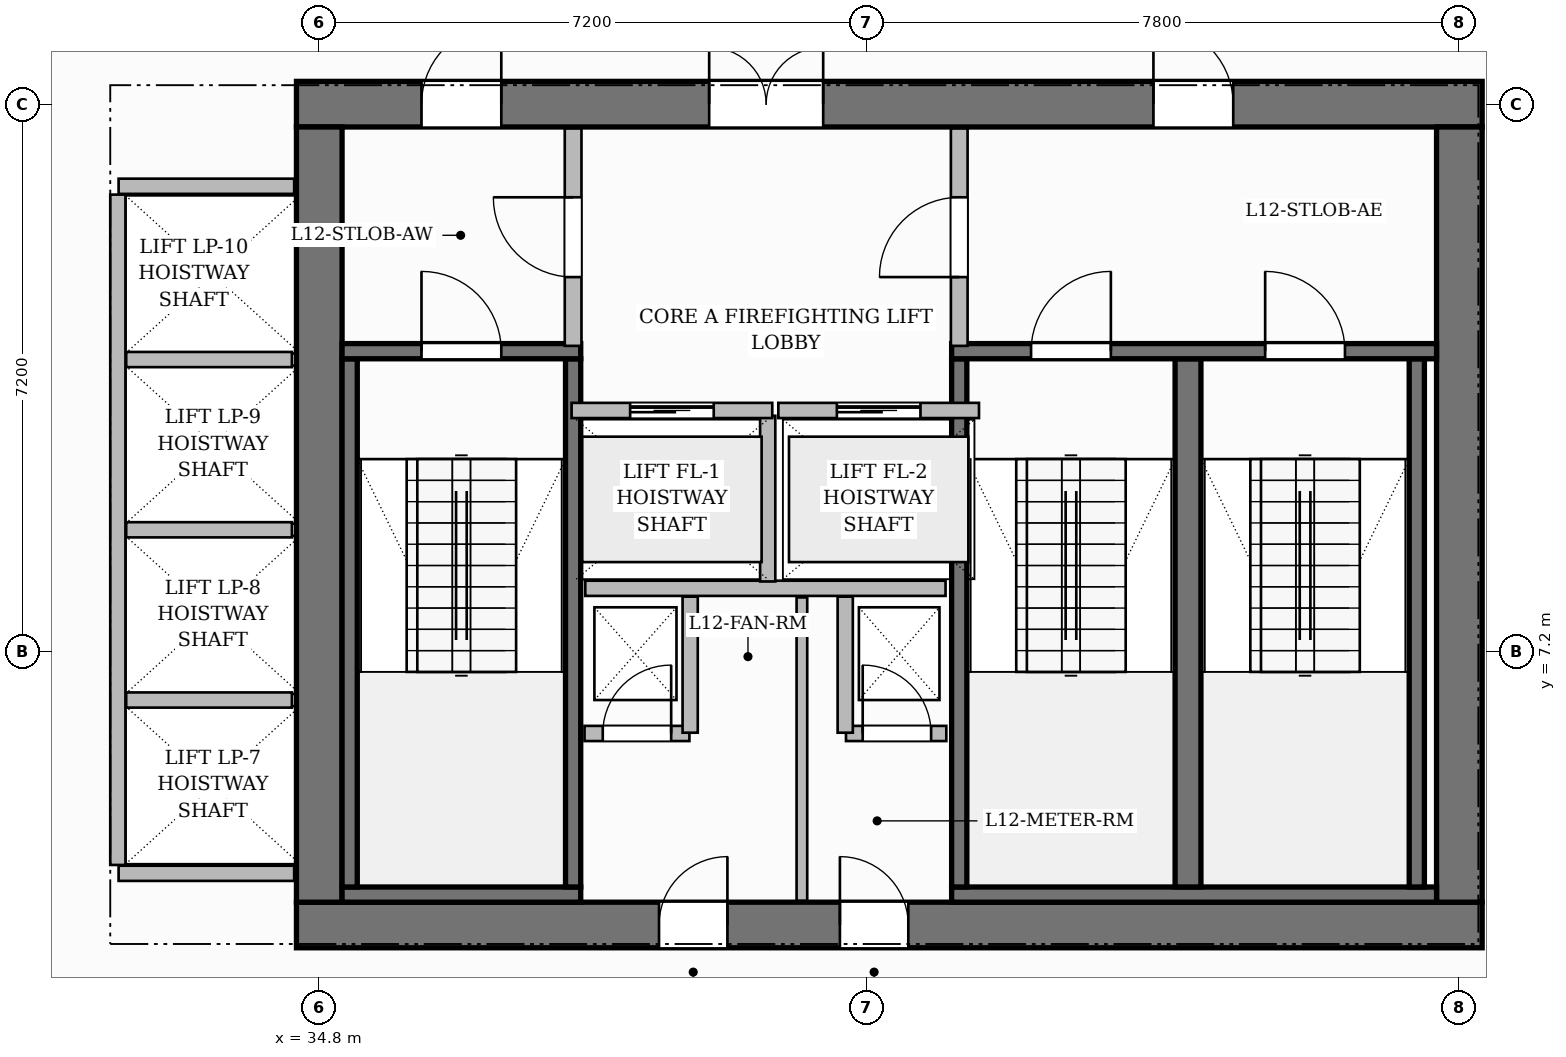
"""IFC4 building model, lengths in metres.
Left out: names, types, materials, properties, quantities, classifications, styles, units other than length and angle.
Written with IfcOpenShell. Run it as: python <this file> out.ifc"""

import sys

from ifc_helpers import new_model, si_unit, direction, frame, frame_2d, origin, place, context, subcontext, project, spatial, rectangle, extrude, source, transform, mapped, element, fill, save


model = new_model("IFC4")
c1 = context("Model", 3, precision=1e-05, world=origin(), true_north=direction((0.0, 1.0)))
c2 = subcontext(c1, "Body", "Model", "MODEL_VIEW")
j1 = project(units=[si_unit("LENGTHUNIT", "METRE"), si_unit("PLANEANGLEUNIT", "RADIAN")], contexts=[c1])
p1 = place(None, origin())
s1 = spatial("IfcSite", under=j1, at=p1, CompositionType="ELEMENT")
p2 = place(p1, origin())
s2 = spatial("IfcBuilding", under=s1, at=p2, CompositionType="ELEMENT")
p3 = place(p2, frame((0.0, 0.0, 54.6)))
s3 = spatial("IfcBuildingStorey", under=s2, at=p3, CompositionType="ELEMENT", Elevation=54.6)
p4 = place(p3, frame((34.5, 3.6, 0.0), z_axis=(0.0, 0.0, 1.0), x_axis=(1.0, 0.0, 0.0)))
e1 = element("IfcWall", 1, at=p4, inside=s3, PredefinedType="SHEAR", context=c2, shape_type="SweptSolid", body=[
    extrude(rectangle(XDim=15.6, YDim=0.6, at=frame_2d((7.8, 0.0))), origin(), (0.0, 0.0, 1.0), 3.7),
])
p5 = place(p4, frame((4.77, 0.0, 0.0)))
e2 = element("IfcOpeningElement", 2, at=p5, cuts=e1, PredefinedType="OPENING", context=c2, shape_type="SweptSolid", body=[
    extrude(rectangle(XDim=0.9, YDim=2.1, at=frame_2d((0.45, 1.05))), frame((0.0, 0.31, 0.0), z_axis=(0.0, -1.0, 0.0), x_axis=(1.0, 0.0, 0.0)), (0.0, 0.0, 1.0), 0.62),
])
p6 = place(p4, frame((7.15, 0.0, 0.0)))
e3 = element("IfcOpeningElement", 3, at=p6, cuts=e1, PredefinedType="OPENING", context=c2, shape_type="SweptSolid", body=[
    extrude(rectangle(XDim=0.9, YDim=2.1, at=frame_2d((0.45, 1.05))), frame((0.0, 0.31, 0.0), z_axis=(0.0, -1.0, 0.0), x_axis=(1.0, 0.0, 0.0)), (0.0, 0.0, 1.0), 0.62),
])
p7 = place(p3, frame((34.5, 14.4, 0.0), z_axis=(0.0, 0.0, 1.0), x_axis=(1.0, 0.0, 0.0)))
e4 = element("IfcWall", 4, at=p7, inside=s3, PredefinedType="SHEAR", context=c2, shape_type="SweptSolid", body=[
    extrude(rectangle(XDim=15.6, YDim=0.6, at=frame_2d((7.8, 0.0))), origin(), (0.0, 0.0, 1.0), 3.7),
])
p8 = place(p7, frame((5.43, 0.0, 0.0)))
e5 = element("IfcOpeningElement", 5, at=p8, cuts=e4, PredefinedType="OPENING", context=c2, shape_type="SweptSolid", body=[
    extrude(rectangle(XDim=1.5, YDim=2.2, at=frame_2d((0.75, 1.1))), frame((0.0, 0.31, 0.0), z_axis=(0.0, -1.0, 0.0), x_axis=(1.0, 0.0, 0.0)), (0.0, 0.0, 1.0), 0.62),
])
p9 = place(p7, frame((1.645, 0.0, 0.0)))
e6 = element("IfcOpeningElement", 6, at=p9, cuts=e4, PredefinedType="OPENING", context=c2, shape_type="SweptSolid", body=[
    extrude(rectangle(XDim=1.05, YDim=2.15, at=frame_2d((0.525, 1.075))), frame((0.0, 0.31, 0.0), z_axis=(0.0, -1.0, 0.0), x_axis=(1.0, 0.0, 0.0)), (0.0, 0.0, 1.0), 0.62),
])
p10 = place(p7, frame((11.275, 0.0, 0.0)))
e7 = element("IfcOpeningElement", 7, at=p10, cuts=e4, PredefinedType="OPENING", context=c2, shape_type="SweptSolid", body=[
    extrude(rectangle(XDim=1.05, YDim=2.15, at=frame_2d((0.525, 1.075))), frame((0.0, 0.31, 0.0), z_axis=(0.0, -1.0, 0.0), x_axis=(1.0, 0.0, 0.0)), (0.0, 0.0, 1.0), 0.62),
])
for number, where, z_axis, x_axis in (
    (8, (34.8, 3.9, 0.0), (0.0, 0.0, 1.0), (0.0, 1.0, 0.0)),
    (9, (49.8, 3.9, 0.0), (0.0, 0.0, 1.0), (0.0, 1.0, 0.0)),
):
    element("IfcWall", number, at=place(p3, frame(where, z_axis=z_axis, x_axis=x_axis)), inside=s3, PredefinedType="SHEAR", context=c2, shape_type="SweptSolid", body=[
        extrude(rectangle(XDim=10.2, YDim=0.6, at=frame_2d((5.1, 0.0))), origin(), (0.0, 0.0, 1.0), 3.7),
    ])
p11 = place(p3, frame((35.1, 4.0, 0.0), z_axis=(0.0, 0.0, 1.0), x_axis=(1.0, 0.0, 0.0)))
e10 = element("IfcWall", 10, at=p11, inside=s3, PredefinedType="SHEAR", context=c2, shape_type="SweptSolid", body=[
    extrude(rectangle(XDim=3.14, YDim=0.2, at=frame_2d((1.57, 0.0))), origin(), (0.0, 0.0, 1.0), 3.7),
])
for number, where, z_axis, x_axis in (
    (11, (35.2, 4.1, 0.0), (0.0, 0.0, 1.0), (0.0, 1.0, 0.0)),
    (12, (38.14, 4.1, 0.0), (0.0, 0.0, 1.0), (0.0, 1.0, 0.0)),
):
    element("IfcWall", number, at=place(p3, frame(where, z_axis=z_axis, x_axis=x_axis)), inside=s3, PredefinedType="SHEAR", context=c2, shape_type="SweptSolid", body=[
        extrude(rectangle(XDim=6.95, YDim=0.2, at=frame_2d((3.475, 0.0))), origin(), (0.0, 0.0, 1.0), 3.7),
    ])
p12 = place(p3, frame((35.1, 11.15, 0.0), z_axis=(0.0, 0.0, 1.0), x_axis=(1.0, 0.0, 0.0)))
e13 = element("IfcWall", 13, at=p12, inside=s3, PredefinedType="SHEAR", context=c2, shape_type="SweptSolid", body=[
    extrude(rectangle(XDim=3.14, YDim=0.2, at=frame_2d((1.57, 0.0))), origin(), (0.0, 0.0, 1.0), 3.7),
])
p13 = place(p12, frame((1.045, 0.0, 0.0)))
e14 = element("IfcOpeningElement", 14, at=p13, cuts=e13, PredefinedType="OPENING", context=c2, shape_type="SweptSolid", body=[
    extrude(rectangle(XDim=1.05, YDim=2.2, at=frame_2d((0.525, 1.1))), frame((0.0, 0.11, 0.0), z_axis=(0.0, -1.0, 0.0), x_axis=(1.0, 0.0, 0.0)), (0.0, 0.0, 1.0), 0.22),
])
p14 = place(p3, frame((43.12, 4.0, 0.0), z_axis=(0.0, 0.0, 1.0), x_axis=(1.0, 0.0, 0.0)))
e15 = element("IfcWall", 15, at=p14, inside=s3, PredefinedType="SHEAR", context=c2, shape_type="SweptSolid", body=[
    extrude(rectangle(XDim=6.38, YDim=0.2, at=frame_2d((3.19, 0.0))), origin(), (0.0, 0.0, 1.0), 3.7),
])
p15 = place(p3, frame((43.22, 4.1, 0.0), z_axis=(0.0, 0.0, 1.0), x_axis=(0.0, 1.0, 0.0)))
e16 = element("IfcWall", 16, at=p15, inside=s3, PredefinedType="SHEAR", context=c2, shape_type="SweptSolid", body=[
    extrude(rectangle(XDim=6.95, YDim=0.2, at=frame_2d((3.475, 0.0))), origin(), (0.0, 0.0, 1.0), 3.7),
])
p16 = place(p3, frame((46.23, 4.1, 0.0), z_axis=(0.0, 0.0, 1.0), x_axis=(0.0, 1.0, 0.0)))
e17 = element("IfcWall", 17, at=p16, inside=s3, PredefinedType="SHEAR", context=c2, shape_type="SweptSolid", body=[
    extrude(rectangle(XDim=6.95, YDim=0.34, at=frame_2d((3.475, 0.0))), origin(), (0.0, 0.0, 1.0), 3.7),
])
p17 = place(p3, frame((49.24, 4.1, 0.0), z_axis=(0.0, 0.0, 1.0), x_axis=(0.0, 1.0, 0.0)))
e18 = element("IfcWall", 18, at=p17, inside=s3, PredefinedType="SHEAR", context=c2, shape_type="SweptSolid", body=[
    extrude(rectangle(XDim=6.95, YDim=0.2, at=frame_2d((3.475, 0.0))), origin(), (0.0, 0.0, 1.0), 3.7),
])
p18 = place(p3, frame((43.12, 11.15, 0.0), z_axis=(0.0, 0.0, 1.0), x_axis=(1.0, 0.0, 0.0)))
e19 = element("IfcWall", 19, at=p18, inside=s3, PredefinedType="SHEAR", context=c2, shape_type="SweptSolid", body=[
    extrude(rectangle(XDim=6.38, YDim=0.2, at=frame_2d((3.19, 0.0))), origin(), (0.0, 0.0, 1.0), 3.7),
])
p19 = place(p18, frame((1.045, 0.0, 0.0)))
e20 = element("IfcOpeningElement", 20, at=p19, cuts=e19, PredefinedType="OPENING", context=c2, shape_type="SweptSolid", body=[
    extrude(rectangle(XDim=1.05, YDim=2.2, at=frame_2d((0.525, 1.1))), frame((0.0, 0.11, 0.0), z_axis=(0.0, -1.0, 0.0), x_axis=(1.0, 0.0, 0.0)), (0.0, 0.0, 1.0), 0.22),
])
p20 = place(p18, frame((4.125, 0.0, 0.0)))
e21 = element("IfcOpeningElement", 21, at=p20, cuts=e19, PredefinedType="OPENING", context=c2, shape_type="SweptSolid", body=[
    extrude(rectangle(XDim=1.05, YDim=2.2, at=frame_2d((0.525, 1.1))), frame((0.0, 0.11, 0.0), z_axis=(0.0, -1.0, 0.0), x_axis=(1.0, 0.0, 0.0)), (0.0, 0.0, 1.0), 0.22),
])
p21 = place(p3, frame((38.3, 8.03, 0.0), z_axis=(0.0, 0.0, 1.0), x_axis=(1.0, 0.0, 0.0)))
e22 = element("IfcWall", 22, at=p21, inside=s3, PredefinedType="PARTITIONING", context=c2, shape_type="SweptSolid", body=[
    extrude(rectangle(XDim=4.74, YDim=0.2, at=frame_2d((2.37, 0.0))), origin(), (0.0, 0.0, 1.0), 3.45),
])
p22 = place(p3, frame((40.7, 8.12, 0.0), z_axis=(0.0, 0.0, 1.0), x_axis=(0.0, 1.0, 0.0)))
e23 = element("IfcWall", 23, at=p22, inside=s3, PredefinedType="PARTITIONING", context=c2, shape_type="SweptSolid", body=[
    extrude(rectangle(XDim=2.18, YDim=0.2, at=frame_2d((1.09, 0.0))), origin(), (0.0, 0.0, 1.0), 3.45),
])
p23 = place(p3, frame((38.14, 11.22, 0.0), z_axis=(0.0, 0.0, 1.0), x_axis=(0.0, 1.0, 0.0)))
e24 = element("IfcWall", 24, at=p23, inside=s3, PredefinedType="PARTITIONING", context=c2, shape_type="SweptSolid", body=[
    extrude(rectangle(XDim=2.86, YDim=0.22, at=frame_2d((1.43, 0.0))), origin(), (0.0, 0.0, 1.0), 3.45),
])
p24 = place(p23, frame((0.905, 0.0, 0.0)))
e25 = element("IfcOpeningElement", 25, at=p24, cuts=e24, PredefinedType="OPENING", context=c2, shape_type="SweptSolid", body=[
    extrude(rectangle(XDim=1.05, YDim=2.15, at=frame_2d((0.525, 1.075))), frame((0.0, 0.12, 0.0), z_axis=(0.0, -1.0, 0.0), x_axis=(1.0, 0.0, 0.0)), (0.0, 0.0, 1.0), 0.24),
])
p25 = place(p3, frame((43.22, 11.22, 0.0), z_axis=(0.0, 0.0, 1.0), x_axis=(0.0, 1.0, 0.0)))
e26 = element("IfcWall", 26, at=p25, inside=s3, PredefinedType="PARTITIONING", context=c2, shape_type="SweptSolid", body=[
    extrude(rectangle(XDim=2.86, YDim=0.22, at=frame_2d((1.43, 0.0))), origin(), (0.0, 0.0, 1.0), 3.45),
])
p26 = place(p25, frame((0.905, 0.0, 0.0)))
e27 = element("IfcOpeningElement", 27, at=p26, cuts=e26, PredefinedType="OPENING", context=c2, shape_type="SweptSolid", body=[
    extrude(rectangle(XDim=1.05, YDim=2.15, at=frame_2d((0.525, 1.075))), frame((0.0, 0.12, 0.0), z_axis=(0.0, -1.0, 0.0), x_axis=(1.0, 0.0, 0.0)), (0.0, 0.0, 1.0), 0.24),
])
p27 = place(p3, frame((38.29, 6.12, 0.0), z_axis=(0.0, 0.0, 1.0), x_axis=(1.0, 0.0, 0.0)))
e28 = element("IfcWall", 28, at=p27, inside=s3, PredefinedType="PARTITIONING", context=c2, shape_type="SweptSolid", body=[
    extrude(rectangle(XDim=1.38, YDim=0.2, at=frame_2d((0.69, 0.0))), origin(), (0.0, 0.0, 1.0), 3.45),
])
p28 = place(p27, frame((0.24, 0.0, 0.0)))
e29 = element("IfcOpeningElement", 29, at=p28, cuts=e28, PredefinedType="OPENING", context=c2, shape_type="SweptSolid", body=[
    extrude(rectangle(XDim=0.9, YDim=2.1, at=frame_2d((0.45, 1.05))), frame((0.0, 0.11, 0.0), z_axis=(0.0, -1.0, 0.0), x_axis=(1.0, 0.0, 0.0)), (0.0, 0.0, 1.0), 0.22),
])
p29 = place(p3, frame((39.68, 6.13, 0.0), z_axis=(0.0, 0.0, 1.0), x_axis=(0.0, 1.0, 0.0)))
e30 = element("IfcWall", 30, at=p29, inside=s3, PredefinedType="PARTITIONING", context=c2, shape_type="SweptSolid", body=[
    extrude(rectangle(XDim=1.79, YDim=0.2, at=frame_2d((0.895, 0.0))), origin(), (0.0, 0.0, 1.0), 3.45),
])
p30 = place(p3, frame((41.73, 6.12, 0.0), z_axis=(0.0, 0.0, 1.0), x_axis=(1.0, 0.0, 0.0)))
e31 = element("IfcWall", 31, at=p30, inside=s3, PredefinedType="PARTITIONING", context=c2, shape_type="SweptSolid", body=[
    extrude(rectangle(XDim=1.32, YDim=0.2, at=frame_2d((0.66, 0.0))), origin(), (0.0, 0.0, 1.0), 3.45),
])
p31 = place(p30, frame((0.22, 0.0, 0.0)))
e32 = element("IfcOpeningElement", 32, at=p31, cuts=e31, PredefinedType="OPENING", context=c2, shape_type="SweptSolid", body=[
    extrude(rectangle(XDim=0.9, YDim=2.1, at=frame_2d((0.45, 1.05))), frame((0.0, 0.11, 0.0), z_axis=(0.0, -1.0, 0.0), x_axis=(1.0, 0.0, 0.0)), (0.0, 0.0, 1.0), 0.22),
])
p32 = place(p3, frame((41.72, 6.13, 0.0), z_axis=(0.0, 0.0, 1.0), x_axis=(0.0, 1.0, 0.0)))
e33 = element("IfcWall", 33, at=p32, inside=s3, PredefinedType="PARTITIONING", context=c2, shape_type="SweptSolid", body=[
    extrude(rectangle(XDim=1.79, YDim=0.2, at=frame_2d((0.895, 0.0))), origin(), (0.0, 0.0, 1.0), 3.45),
])
p33 = place(p3, frame((41.15, 3.92, 0.0), z_axis=(0.0, 0.0, 1.0), x_axis=(0.0, 1.0, 0.0)))
e34 = element("IfcWall", 34, at=p33, inside=s3, PredefinedType="PARTITIONING", context=c2, shape_type="SweptSolid", body=[
    extrude(rectangle(XDim=3.99, YDim=0.14, at=frame_2d((1.995, 0.0))), origin(), (0.0, 0.0, 1.0), 3.45),
])
for number, where, z_axis, x_axis in (
    (35, (32.16, 4.28, 0.0), (0.0, 0.0, 1.0), (1.0, 0.0, 0.0)),
    (36, (32.16, 13.32, 0.0), (0.0, 0.0, 1.0), (1.0, 0.0, 0.0)),
):
    element("IfcWall", number, at=place(p3, frame(where, z_axis=z_axis, x_axis=x_axis)), inside=s3, PredefinedType="PARTITIONING", context=c2, shape_type="SweptSolid", body=[
        extrude(rectangle(XDim=2.31, YDim=0.2, at=frame_2d((1.155, 0.0))), origin(), (0.0, 0.0, 1.0), 3.45),
    ])
p34 = place(p3, frame((32.15, 4.39, 0.0), z_axis=(0.0, 0.0, 1.0), x_axis=(0.0, 1.0, 0.0)))
e37 = element("IfcWall", 37, at=p34, inside=s3, PredefinedType="PARTITIONING", context=c2, shape_type="SweptSolid", body=[
    extrude(rectangle(XDim=8.82, YDim=0.2, at=frame_2d((4.41, 0.0))), origin(), (0.0, 0.0, 1.0), 3.45),
])
for number, where, z_axis, x_axis in (
    (38, (32.26, 6.56, 0.0), (0.0, 0.0, 1.0), (1.0, 0.0, 0.0)),
    (39, (32.26, 8.8, 0.0), (0.0, 0.0, 1.0), (1.0, 0.0, 0.0)),
    (40, (32.26, 11.04, 0.0), (0.0, 0.0, 1.0), (1.0, 0.0, 0.0)),
):
    element("IfcWall", number, at=place(p3, frame(where, z_axis=z_axis, x_axis=x_axis)), inside=s3, PredefinedType="PARTITIONING", context=c2, shape_type="SweptSolid", body=[
        extrude(rectangle(XDim=2.18, YDim=0.2, at=frame_2d((1.09, 0.0))), origin(), (0.0, 0.0, 1.0), 3.45),
    ])
p35 = place(p3, frame((38.12, 10.37, 0.0), z_axis=(0.0, 0.0, 1.0), x_axis=(1.0, 0.0, 0.0)))
e41 = element("IfcWall", 41, at=p35, inside=s3, PredefinedType="PARTITIONING", context=c2, shape_type="SweptSolid", body=[
    extrude(rectangle(XDim=2.64, YDim=0.2, at=frame_2d((1.32, 0.0))), origin(), (0.0, 0.0, 1.0), 3.45),
])
p36 = place(p35, frame((0.77, 0.0, 0.0)))
e42 = element("IfcOpeningElement", 42, at=p36, cuts=e41, PredefinedType="OPENING", context=c2, shape_type="SweptSolid", body=[
    extrude(rectangle(XDim=1.1, YDim=2.2, at=frame_2d((0.55, 1.1))), frame((0.0, 0.11, 0.0), z_axis=(0.0, -1.0, 0.0), x_axis=(1.0, 0.0, 0.0)), (0.0, 0.0, 1.0), 0.22),
])
p37 = place(p3, frame((40.84, 10.37, 0.0), z_axis=(0.0, 0.0, 1.0), x_axis=(1.0, 0.0, 0.0)))
e43 = element("IfcWall", 43, at=p37, inside=s3, PredefinedType="PARTITIONING", context=c2, shape_type="SweptSolid", body=[
    extrude(rectangle(XDim=2.64, YDim=0.2, at=frame_2d((1.32, 0.0))), origin(), (0.0, 0.0, 1.0), 3.45),
])
p38 = place(p37, frame((0.77, 0.0, 0.0)))
e44 = element("IfcOpeningElement", 44, at=p38, cuts=e43, PredefinedType="OPENING", context=c2, shape_type="SweptSolid", body=[
    extrude(rectangle(XDim=1.1, YDim=2.2, at=frame_2d((0.55, 1.1))), frame((0.0, 0.11, 0.0), z_axis=(0.0, -1.0, 0.0), x_axis=(1.0, 0.0, 0.0)), (0.0, 0.0, 1.0), 0.22),
])
m1 = source(origin(), c2, "Body", "SweptSolid", [
    extrude(rectangle(XDim=1.05, YDim=2.2, at=frame_2d((0.525, 1.1))), frame((0.0, 0.025, 0.0), z_axis=(0.0, -1.0, 0.0), x_axis=(1.0, 0.0, 0.0)), (0.0, 0.0, 1.0), 0.05),
])
p39 = place(p13, origin())
e45 = element("IfcDoor", 45, at=p39, inside=s3, OperationType="SINGLE_SWING_LEFT", PredefinedType="DOOR", context=c2, shape_type="MappedRepresentation", body=[
    mapped(m1, transform((0.0, 0.0, 0.0), scale=1.0)),
])
fill(e14, e45)
p40 = place(p19, origin())
e46 = element("IfcDoor", 46, at=p40, inside=s3, OperationType="SINGLE_SWING_RIGHT", PredefinedType="DOOR", context=c2, shape_type="MappedRepresentation", body=[
    mapped(m1, transform((0.0, 0.0, 0.0), scale=1.0)),
])
fill(e20, e46)
p41 = place(p20, origin())
e47 = element("IfcDoor", 47, at=p41, inside=s3, OperationType="SINGLE_SWING_LEFT", PredefinedType="DOOR", context=c2, shape_type="MappedRepresentation", body=[
    mapped(m1, transform((0.0, 0.0, 0.0), scale=1.0)),
])
fill(e21, e47)
m2 = source(origin(), c2, "Body", "SweptSolid", [
    extrude(rectangle(XDim=1.05, YDim=2.15, at=frame_2d((0.525, 1.075))), frame((0.0, 0.025, 0.0), z_axis=(0.0, -1.0, 0.0), x_axis=(1.0, 0.0, 0.0)), (0.0, 0.0, 1.0), 0.05),
])
p42 = place(p24, origin())
e48 = element("IfcDoor", 48, at=p42, inside=s3, OperationType="SINGLE_SWING_RIGHT", PredefinedType="DOOR", context=c2, shape_type="MappedRepresentation", body=[
    mapped(m2, transform((0.0, 0.0, 0.0), scale=1.0)),
])
fill(e25, e48)
p43 = place(p26, origin())
e49 = element("IfcDoor", 49, at=p43, inside=s3, OperationType="SINGLE_SWING_LEFT", PredefinedType="DOOR", context=c2, shape_type="MappedRepresentation", body=[
    mapped(m2, transform((0.0, 0.0, 0.0), scale=1.0)),
])
fill(e27, e49)
m3 = source(origin(), c2, "Body", "SweptSolid", [
    extrude(rectangle(XDim=1.5, YDim=2.2, at=frame_2d((0.75, 1.1))), frame((0.0, 0.025, 0.0), z_axis=(0.0, -1.0, 0.0), x_axis=(1.0, 0.0, 0.0)), (0.0, 0.0, 1.0), 0.05),
])
p44 = place(p8, origin())
e50 = element("IfcDoor", 50, at=p44, inside=s3, OperationType="DOUBLE_DOOR_SINGLE_SWING", PredefinedType="DOOR", context=c2, shape_type="MappedRepresentation", body=[
    mapped(m3, transform((0.0, 0.0, 0.0), scale=1.0)),
])
fill(e5, e50)
p45 = place(p9, origin())
e51 = element("IfcDoor", 51, at=p45, inside=s3, OperationType="SINGLE_SWING_RIGHT", PredefinedType="DOOR", context=c2, shape_type="MappedRepresentation", body=[
    mapped(m2, transform((0.0, 0.0, 0.0), scale=1.0)),
])
fill(e6, e51)
p46 = place(p10, origin())
e52 = element("IfcDoor", 52, at=p46, inside=s3, OperationType="SINGLE_SWING_LEFT", PredefinedType="DOOR", context=c2, shape_type="MappedRepresentation", body=[
    mapped(m2, transform((0.0, 0.0, 0.0), scale=1.0)),
])
fill(e7, e52)
m4 = source(origin(), c2, "Body", "SweptSolid", [
    extrude(rectangle(XDim=0.9, YDim=2.1, at=frame_2d((0.45, 1.05))), frame((0.0, 0.025, 0.0), z_axis=(0.0, -1.0, 0.0), x_axis=(1.0, 0.0, 0.0)), (0.0, 0.0, 1.0), 0.05),
])
p47 = place(p28, origin())
e53 = element("IfcDoor", 53, at=p47, inside=s3, OperationType="SINGLE_SWING_RIGHT", PredefinedType="DOOR", context=c2, shape_type="MappedRepresentation", body=[
    mapped(m4, transform((0.0, 0.0, 0.0), scale=1.0)),
])
fill(e29, e53)
p48 = place(p31, origin())
e54 = element("IfcDoor", 54, at=p48, inside=s3, OperationType="SINGLE_SWING_LEFT", PredefinedType="DOOR", context=c2, shape_type="MappedRepresentation", body=[
    mapped(m4, transform((0.0, 0.0, 0.0), scale=1.0)),
])
fill(e32, e54)
p49 = place(p5, origin())
e55 = element("IfcDoor", 55, at=p49, inside=s3, OperationType="SINGLE_SWING_RIGHT", PredefinedType="DOOR", context=c2, shape_type="MappedRepresentation", body=[
    mapped(m4, transform((0.0, 0.0, 0.0), scale=1.0)),
])
fill(e2, e55)
p50 = place(p6, origin())
e56 = element("IfcDoor", 56, at=p50, inside=s3, OperationType="SINGLE_SWING_LEFT", PredefinedType="DOOR", context=c2, shape_type="MappedRepresentation", body=[
    mapped(m4, transform((0.0, 0.0, 0.0), scale=1.0)),
])
fill(e3, e56)
m5 = source(origin(), c2, "Body", "SweptSolid", [
    extrude(rectangle(XDim=1.1, YDim=2.2, at=frame_2d((0.55, 1.1))), frame((0.0, 0.025, 0.0), z_axis=(0.0, -1.0, 0.0), x_axis=(1.0, 0.0, 0.0)), (0.0, 0.0, 1.0), 0.05),
])
p51 = place(p36, origin())
e57 = element("IfcDoor", 57, at=p51, inside=s3, OperationType="SLIDING_TO_LEFT", PredefinedType="DOOR", context=c2, shape_type="MappedRepresentation", body=[
    mapped(m5, transform((0.0, 0.0, 0.0), scale=1.0)),
])
fill(e42, e57)
p52 = place(p38, origin())
e58 = element("IfcDoor", 58, at=p52, inside=s3, OperationType="SLIDING_TO_LEFT", PredefinedType="DOOR", context=c2, shape_type="MappedRepresentation", body=[
    mapped(m5, transform((0.0, 0.0, 0.0), scale=1.0)),
])
fill(e44, e58)
save(model, sys.argv[1])
